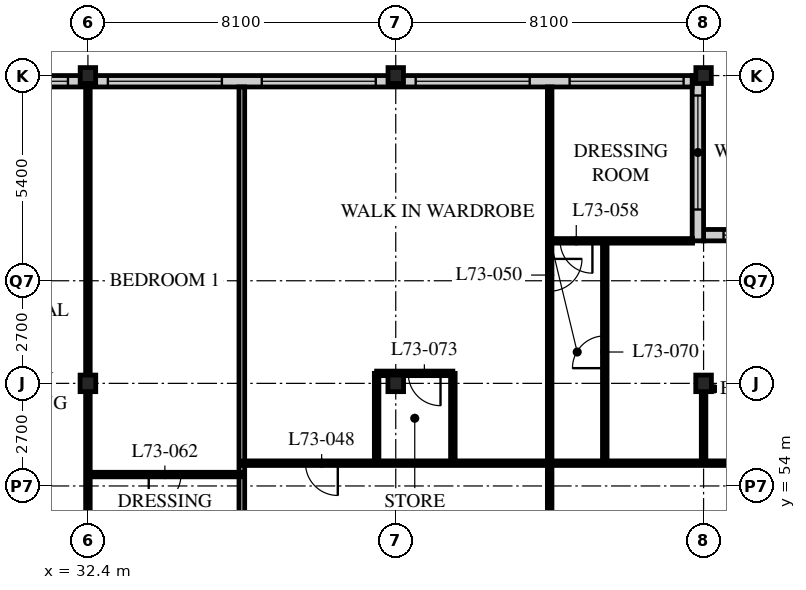
"""IFC4 building model, lengths in metres.
Left out: names, types, materials, properties, quantities, classifications, styles, units other than length and angle.
Written with IfcOpenShell. Run it as: python <this file> out.ifc"""

import sys

from ifc_helpers import new_model, si_unit, direction, frame, frame_2d, origin, origin_2d, place, context, subcontext, project, spatial, rectangle, i_section, extrude, element, fill, save


model = new_model("IFC4")
c1 = context("Model", 3, precision=1e-05, world=origin(), true_north=direction((0.0, 1.0)))
c2 = subcontext(c1, "Body", "Model", "MODEL_VIEW")
j1 = project(units=[si_unit("LENGTHUNIT", "METRE"), si_unit("PLANEANGLEUNIT", "RADIAN")], contexts=[c1])
p1 = place(None, origin())
s1 = spatial("IfcSite", under=j1, at=p1, CompositionType="ELEMENT")
p2 = place(p1, origin())
s2 = spatial("IfcBuilding", under=s1, at=p2, CompositionType="ELEMENT")
p3 = place(p2, frame((0.0, 0.0, 285.3)))
s3 = spatial("IfcBuildingStorey", under=s2, at=p3, CompositionType="ELEMENT", Elevation=285.3)
p4 = place(p3, frame((32.4, 56.7, 0.0), z_axis=(0.0, 0.0, 1.0), x_axis=(1.0, 0.0, 0.0)))
e1 = element("IfcColumn", 1, at=p4, inside=s3, PredefinedType="COLUMN", context=c2, shape_type="SweptSolid", body=[
    extrude(i_section(OverallWidth=0.412, OverallDepth=0.437, WebThickness=0.036, FlangeThickness=0.058, FilletRadius=0.015, at=origin_2d()), origin(), (0.0, 0.0, 1.0), 3.9),
])
p5 = place(p3, frame((32.4, 64.8, 0.0), z_axis=(0.0, 0.0, 1.0), x_axis=(1.0, 0.0, 0.0)))
e2 = element("IfcColumn", 2, at=p5, inside=s3, PredefinedType="COLUMN", context=c2, shape_type="SweptSolid", body=[
    extrude(i_section(OverallWidth=0.407, OverallDepth=0.419, WebThickness=0.031, FlangeThickness=0.049, FilletRadius=0.015, at=origin_2d()), origin(), (0.0, 0.0, 1.0), 3.9),
])
p6 = place(p3, frame((40.5, 56.7, 0.0), z_axis=(0.0, 0.0, 1.0), x_axis=(1.0, 0.0, 0.0)))
e3 = element("IfcColumn", 3, at=p6, inside=s3, PredefinedType="COLUMN", context=c2, shape_type="SweptSolid", body=[
    extrude(i_section(OverallWidth=0.412, OverallDepth=0.437, WebThickness=0.036, FlangeThickness=0.058, FilletRadius=0.015, at=origin_2d()), origin(), (0.0, 0.0, 1.0), 3.9),
])
p7 = place(p3, frame((40.5, 64.8, 0.0), z_axis=(0.0, 0.0, 1.0), x_axis=(1.0, 0.0, 0.0)))
e4 = element("IfcColumn", 4, at=p7, inside=s3, PredefinedType="COLUMN", context=c2, shape_type="SweptSolid", body=[
    extrude(i_section(OverallWidth=0.407, OverallDepth=0.419, WebThickness=0.031, FlangeThickness=0.049, FilletRadius=0.015, at=origin_2d()), origin(), (0.0, 0.0, 1.0), 3.9),
])
p8 = place(p3, frame((48.6, 56.7, 0.0), z_axis=(0.0, 0.0, 1.0), x_axis=(1.0, 0.0, 0.0)))
e5 = element("IfcColumn", 5, at=p8, inside=s3, PredefinedType="COLUMN", context=c2, shape_type="SweptSolid", body=[
    extrude(i_section(OverallWidth=0.412, OverallDepth=0.437, WebThickness=0.036, FlangeThickness=0.058, FilletRadius=0.015, at=origin_2d()), origin(), (0.0, 0.0, 1.0), 3.9),
])
p9 = place(p3, frame((48.6, 64.8, 0.0), z_axis=(0.0, 0.0, 1.0), x_axis=(1.0, 0.0, 0.0)))
e6 = element("IfcColumn", 6, at=p9, inside=s3, PredefinedType="COLUMN", context=c2, shape_type="SweptSolid", body=[
    extrude(i_section(OverallWidth=0.407, OverallDepth=0.419, WebThickness=0.031, FlangeThickness=0.049, FilletRadius=0.015, at=origin_2d()), origin(), (0.0, 0.0, 1.0), 3.9),
])
p10 = place(p3, frame((52.35, 60.6, 0.0), z_axis=(0.0, 0.0, 1.0), x_axis=(-1.0, 0.0, 0.0)))
e7 = element("IfcWall", 7, at=p10, inside=s3, PredefinedType="SOLIDWALL", context=c2, shape_type="SweptSolid", body=[
    extrude(rectangle(XDim=3.75, YDim=0.3, at=frame_2d((1.875, 0.0))), origin(), (0.0, 0.0, 1.0), 3.69),
])
p11 = place(p10, frame((0.225, 0.0, 0.6)))
e8 = element("IfcOpeningElement", 8, at=p11, cuts=e7, PredefinedType="OPENING", context=c2, shape_type="SweptSolid", body=[
    extrude(rectangle(XDim=3.0, YDim=2.3, at=frame_2d((1.5, 1.15))), frame((0.0, 0.16, 0.0), z_axis=(0.0, -1.0, 0.0), x_axis=(1.0, 0.0, 0.0)), (0.0, 0.0, 1.0), 0.32),
])
p12 = place(p3, frame((48.45, 60.45, 0.0), z_axis=(0.0, 0.0, 1.0), x_axis=(0.0, 1.0, 0.0)))
e9 = element("IfcWall", 9, at=p12, inside=s3, PredefinedType="SOLIDWALL", context=c2, shape_type="SweptSolid", body=[
    extrude(rectangle(XDim=4.35, YDim=0.3, at=frame_2d((2.175, 0.0))), origin(), (0.0, 0.0, 1.0), 3.69),
])
p13 = place(p12, frame((0.825, 0.0, 0.6)))
e10 = element("IfcOpeningElement", 10, at=p13, cuts=e9, PredefinedType="OPENING", context=c2, shape_type="SweptSolid", body=[
    extrude(rectangle(XDim=3.0, YDim=2.3, at=frame_2d((1.5, 1.15))), frame((0.0, 0.16, 0.0), z_axis=(0.0, -1.0, 0.0), x_axis=(1.0, 0.0, 0.0)), (0.0, 0.0, 1.0), 0.32),
])
p14 = place(p3, frame((48.3, 64.65, 0.0), z_axis=(0.0, 0.0, 1.0), x_axis=(-1.0, 0.0, 0.0)))
e11 = element("IfcWall", 11, at=p14, inside=s3, PredefinedType="SOLIDWALL", context=c2, shape_type="SweptSolid", body=[
    extrude(rectangle(XDim=40.2, YDim=0.3, at=frame_2d((20.1, 0.0))), origin(), (0.0, 0.0, 1.0), 3.69),
])
p15 = place(p14, frame((0.225, 0.0, 0.6)))
e12 = element("IfcOpeningElement", 12, at=p15, cuts=e11, PredefinedType="OPENING", context=c2, shape_type="SweptSolid", body=[
    extrude(rectangle(XDim=3.0, YDim=2.4, at=frame_2d((1.5, 1.2))), frame((0.0, 0.16, 0.0), z_axis=(0.0, -1.0, 0.0), x_axis=(1.0, 0.0, 0.0)), (0.0, 0.0, 1.0), 0.32),
])
p16 = place(p14, frame((4.275, 0.0, 0.6)))
e13 = element("IfcOpeningElement", 13, at=p16, cuts=e11, PredefinedType="OPENING", context=c2, shape_type="SweptSolid", body=[
    extrude(rectangle(XDim=3.0, YDim=2.4, at=frame_2d((1.5, 1.2))), frame((0.0, 0.16, 0.0), z_axis=(0.0, -1.0, 0.0), x_axis=(1.0, 0.0, 0.0)), (0.0, 0.0, 1.0), 0.32),
])
p17 = place(p14, frame((8.325, 0.0, 0.6)))
e14 = element("IfcOpeningElement", 14, at=p17, cuts=e11, PredefinedType="OPENING", context=c2, shape_type="SweptSolid", body=[
    extrude(rectangle(XDim=3.0, YDim=2.4, at=frame_2d((1.5, 1.2))), frame((0.0, 0.16, 0.0), z_axis=(0.0, -1.0, 0.0), x_axis=(1.0, 0.0, 0.0)), (0.0, 0.0, 1.0), 0.32),
])
p18 = place(p14, frame((12.375, 0.0, 0.6)))
e15 = element("IfcOpeningElement", 15, at=p18, cuts=e11, PredefinedType="OPENING", context=c2, shape_type="SweptSolid", body=[
    extrude(rectangle(XDim=3.0, YDim=2.4, at=frame_2d((1.5, 1.2))), frame((0.0, 0.16, 0.0), z_axis=(0.0, -1.0, 0.0), x_axis=(1.0, 0.0, 0.0)), (0.0, 0.0, 1.0), 0.32),
])
p19 = place(p14, frame((16.425, 0.0, 0.6)))
e16 = element("IfcOpeningElement", 16, at=p19, cuts=e11, PredefinedType="OPENING", context=c2, shape_type="SweptSolid", body=[
    extrude(rectangle(XDim=3.0, YDim=2.4, at=frame_2d((1.5, 1.2))), frame((0.0, 0.16, 0.0), z_axis=(0.0, -1.0, 0.0), x_axis=(1.0, 0.0, 0.0)), (0.0, 0.0, 1.0), 0.32),
])
p20 = place(p14, frame((20.475, 0.0, 0.6)))
e17 = element("IfcOpeningElement", 17, at=p20, cuts=e11, PredefinedType="OPENING", context=c2, shape_type="SweptSolid", body=[
    extrude(rectangle(XDim=3.0, YDim=2.4, at=frame_2d((1.5, 1.2))), frame((0.0, 0.16, 0.0), z_axis=(0.0, -1.0, 0.0), x_axis=(1.0, 0.0, 0.0)), (0.0, 0.0, 1.0), 0.32),
])
p21 = place(p14, frame((24.525, 0.0, 0.6)))
e18 = element("IfcOpeningElement", 18, at=p21, cuts=e11, PredefinedType="OPENING", context=c2, shape_type="SweptSolid", body=[
    extrude(rectangle(XDim=3.0, YDim=2.4, at=frame_2d((1.5, 1.2))), frame((0.0, 0.16, 0.0), z_axis=(0.0, -1.0, 0.0), x_axis=(1.0, 0.0, 0.0)), (0.0, 0.0, 1.0), 0.32),
])
p22 = place(p14, frame((28.575, 0.0, 0.6)))
e19 = element("IfcOpeningElement", 19, at=p22, cuts=e11, PredefinedType="OPENING", context=c2, shape_type="SweptSolid", body=[
    extrude(rectangle(XDim=3.0, YDim=2.4, at=frame_2d((1.5, 1.2))), frame((0.0, 0.16, 0.0), z_axis=(0.0, -1.0, 0.0), x_axis=(1.0, 0.0, 0.0)), (0.0, 0.0, 1.0), 0.32),
])
p23 = place(p14, frame((32.625, 0.0, 0.6)))
e20 = element("IfcOpeningElement", 20, at=p23, cuts=e11, PredefinedType="OPENING", context=c2, shape_type="SweptSolid", body=[
    extrude(rectangle(XDim=3.0, YDim=2.4, at=frame_2d((1.5, 1.2))), frame((0.0, 0.16, 0.0), z_axis=(0.0, -1.0, 0.0), x_axis=(1.0, 0.0, 0.0)), (0.0, 0.0, 1.0), 0.32),
])
p24 = place(p14, frame((36.675, 0.0, 0.6)))
e21 = element("IfcOpeningElement", 21, at=p24, cuts=e11, PredefinedType="OPENING", context=c2, shape_type="SweptSolid", body=[
    extrude(rectangle(XDim=3.0, YDim=2.4, at=frame_2d((1.5, 1.2))), frame((0.0, 0.16, 0.0), z_axis=(0.0, -1.0, 0.0), x_axis=(1.0, 0.0, 0.0)), (0.0, 0.0, 1.0), 0.32),
])
p25 = place(p3, frame((32.4, 51.0, 0.0), z_axis=(0.0, 0.0, 1.0), x_axis=(0.0, 1.0, 0.0)))
e22 = element("IfcWall", 22, at=p25, inside=s3, PredefinedType="PARTITIONING", context=c2, shape_type="SweptSolid", body=[
    extrude(rectangle(XDim=13.5, YDim=0.12, at=frame_2d((6.75, 0.0))), origin(), (0.0, 0.0, 1.0), 3.078),
])
p26 = place(p3, frame((36.45, 64.5, 0.0), z_axis=(0.0, 0.0, 1.0), x_axis=(0.0, -1.0, 0.0)))
e23 = element("IfcWall", 23, at=p26, inside=s3, PredefinedType="PARTITIONING", context=c2, shape_type="SweptSolid", body=[
    extrude(rectangle(XDim=15.9, YDim=0.15, at=frame_2d((7.95, 0.0))), origin(), (0.0, 0.0, 1.0), 3.69),
])
p27 = place(p3, frame((36.45, 54.6, 0.0), z_axis=(0.0, 0.0, 1.0), x_axis=(1.0, 0.0, 0.0)))
e24 = element("IfcWall", 24, at=p27, inside=s3, PredefinedType="PARTITIONING", context=c2, shape_type="SweptSolid", body=[
    extrude(rectangle(XDim=19.95, YDim=0.12, at=frame_2d((9.975, 0.0))), origin(), (0.0, 0.0, 1.0), 3.69),
])
p28 = place(p27, frame((1.675, 0.0, 0.0)))
e25 = element("IfcOpeningElement", 25, at=p28, cuts=e24, PredefinedType="OPENING", context=c2, shape_type="SweptSolid", body=[
    extrude(rectangle(XDim=0.85, YDim=2.1, at=frame_2d((0.425, 1.05))), frame((0.0, 0.07, 0.0), z_axis=(0.0, -1.0, 0.0), x_axis=(1.0, 0.0, 0.0)), (0.0, 0.0, 1.0), 0.14),
])
p29 = place(p3, frame((44.55, 64.5, 0.0), z_axis=(0.0, 0.0, 1.0), x_axis=(0.0, -1.0, 0.0)))
e26 = element("IfcWall", 26, at=p29, inside=s3, PredefinedType="PARTITIONING", context=c2, shape_type="SweptSolid", body=[
    extrude(rectangle(XDim=17.7, YDim=0.12, at=frame_2d((8.85, 0.0))), origin(), (0.0, 0.0, 1.0), 3.69),
])
p30 = place(p29, frame((12.475, 0.0, 0.0)))
e27 = element("IfcOpeningElement", 27, at=p30, cuts=e26, PredefinedType="OPENING", context=c2, shape_type="SweptSolid", body=[
    extrude(rectangle(XDim=0.85, YDim=2.1, at=frame_2d((0.425, 1.05))), frame((0.0, 0.07, 0.0), z_axis=(0.0, -1.0, 0.0), x_axis=(1.0, 0.0, 0.0)), (0.0, 0.0, 1.0), 0.14),
])
p31 = place(p29, frame((4.525, 0.0, 0.0)))
e28 = element("IfcOpeningElement", 28, at=p31, cuts=e26, PredefinedType="OPENING", context=c2, shape_type="SweptSolid", body=[
    extrude(rectangle(XDim=0.85, YDim=2.1, at=frame_2d((0.425, 1.05))), frame((0.0, 0.07, 0.0), z_axis=(0.0, -1.0, 0.0), x_axis=(1.0, 0.0, 0.0)), (0.0, 0.0, 1.0), 0.14),
])
p32 = place(p3, frame((48.31, 60.45, 0.0), z_axis=(0.0, 0.0, 1.0), x_axis=(-1.0, 0.0, 0.0)))
e29 = element("IfcWall", 29, at=p32, inside=s3, PredefinedType="PARTITIONING", context=c2, shape_type="SweptSolid", body=[
    extrude(rectangle(XDim=3.76, YDim=0.12, at=frame_2d((1.88, 0.0))), origin(), (0.0, 0.0, 1.0), 3.69),
])
p33 = place(p32, frame((2.635, 0.0, 0.0)))
e30 = element("IfcOpeningElement", 30, at=p33, cuts=e29, PredefinedType="OPENING", context=c2, shape_type="SweptSolid", body=[
    extrude(rectangle(XDim=0.85, YDim=2.1, at=frame_2d((0.425, 1.05))), frame((0.0, 0.07, 0.0), z_axis=(0.0, -1.0, 0.0), x_axis=(1.0, 0.0, 0.0)), (0.0, 0.0, 1.0), 0.14),
])
p34 = place(p3, frame((32.4, 54.3, 0.0), z_axis=(0.0, 0.0, 1.0), x_axis=(1.0, 0.0, 0.0)))
e31 = element("IfcWall", 31, at=p34, inside=s3, PredefinedType="PARTITIONING", context=c2, shape_type="SweptSolid", body=[
    extrude(rectangle(XDim=4.05, YDim=0.12, at=frame_2d((2.025, 0.0))), origin(), (0.0, 0.0, 1.0), 3.69),
])
p35 = place(p34, frame((1.6, 0.0, 0.0)))
e32 = element("IfcOpeningElement", 32, at=p35, cuts=e31, PredefinedType="OPENING", context=c2, shape_type="SweptSolid", body=[
    extrude(rectangle(XDim=0.85, YDim=2.1, at=frame_2d((0.425, 1.05))), frame((0.0, 0.07, 0.0), z_axis=(0.0, -1.0, 0.0), x_axis=(1.0, 0.0, 0.0)), (0.0, 0.0, 1.0), 0.14),
])
p36 = place(p3, frame((46.0, 54.6, 0.0), z_axis=(0.0, 0.0, 1.0), x_axis=(0.0, 1.0, 0.0)))
e33 = element("IfcWall", 33, at=p36, inside=s3, PredefinedType="PARTITIONING", context=c2, shape_type="SweptSolid", body=[
    extrude(rectangle(XDim=5.85, YDim=0.12, at=frame_2d((2.925, 0.0))), origin(), (0.0, 0.0, 1.0), 3.69),
])
p37 = place(p36, frame((2.5, 0.0, 0.0)))
e34 = element("IfcOpeningElement", 34, at=p37, cuts=e33, PredefinedType="OPENING", context=c2, shape_type="SweptSolid", body=[
    extrude(rectangle(XDim=0.85, YDim=2.1, at=frame_2d((0.425, 1.05))), frame((0.0, 0.07, 0.0), z_axis=(0.0, -1.0, 0.0), x_axis=(1.0, 0.0, 0.0)), (0.0, 0.0, 1.0), 0.14),
])
for number, where, z_axis, x_axis in (
    (35, (39.997, 54.6, 0.0), (0.0, 0.0, 1.0), (0.0, 1.0, 0.0)),
    (36, (42.003, 54.6, 0.0), (0.0, 0.0, 1.0), (0.0, 1.0, 0.0)),
):
    element("IfcWall", number, at=place(p3, frame(where, z_axis=z_axis, x_axis=x_axis)), inside=s3, PredefinedType="PARTITIONING", context=c2, shape_type="SweptSolid", body=[
        extrude(rectangle(XDim=2.363, YDim=0.12, at=frame_2d((1.181, 0.0))), origin(), (0.0, 0.0, 1.0), 3.69),
    ])
p38 = place(p3, frame((39.997, 56.963, 0.0), z_axis=(0.0, 0.0, 1.0), x_axis=(1.0, 0.0, 0.0)))
e37 = element("IfcWall", 37, at=p38, inside=s3, PredefinedType="PARTITIONING", context=c2, shape_type="SweptSolid", body=[
    extrude(rectangle(XDim=2.006, YDim=0.12, at=frame_2d((1.003, 0.0))), origin(), (0.0, 0.0, 1.0), 3.69),
])
p39 = place(p38, frame((0.831, 0.0, 0.0)))
e38 = element("IfcOpeningElement", 38, at=p39, cuts=e37, PredefinedType="OPENING", context=c2, shape_type="SweptSolid", body=[
    extrude(rectangle(XDim=0.85, YDim=2.1, at=frame_2d((0.425, 1.05))), frame((0.0, 0.07, 0.0), z_axis=(0.0, -1.0, 0.0), x_axis=(1.0, 0.0, 0.0)), (0.0, 0.0, 1.0), 0.14),
])
p40 = place(p3, frame((48.6, 54.6, 0.0), z_axis=(0.0, 0.0, 1.0), x_axis=(0.0, 1.0, 0.0)))
e39 = element("IfcWall", 39, at=p40, inside=s3, PredefinedType="PARTITIONING", context=c2, shape_type="SweptSolid", body=[
    extrude(rectangle(XDim=1.897, YDim=0.12, at=frame_2d((0.948, 0.0))), origin(), (0.0, 0.0, 1.0), 3.078),
])
p41 = place(p11, origin())
e40 = element("IfcWindow", 40, at=p41, inside=s3, PartitioningType="SINGLE_PANEL", PredefinedType="WINDOW", context=c2, shape_type="SweptSolid", body=[
    extrude(rectangle(XDim=3.0, YDim=2.3, at=frame_2d((1.5, 1.15))), frame((0.0, 0.03, 0.0), z_axis=(0.0, -1.0, 0.0), x_axis=(1.0, 0.0, 0.0)), (0.0, 0.0, 1.0), 0.06),
])
fill(e8, e40)
p42 = place(p13, origin())
e41 = element("IfcWindow", 41, at=p42, inside=s3, PartitioningType="SINGLE_PANEL", PredefinedType="WINDOW", context=c2, shape_type="SweptSolid", body=[
    extrude(rectangle(XDim=3.0, YDim=2.3, at=frame_2d((1.5, 1.15))), frame((0.0, 0.03, 0.0), z_axis=(0.0, -1.0, 0.0), x_axis=(1.0, 0.0, 0.0)), (0.0, 0.0, 1.0), 0.06),
])
fill(e10, e41)
p43 = place(p15, origin())
e42 = element("IfcWindow", 42, at=p43, inside=s3, PartitioningType="SINGLE_PANEL", PredefinedType="WINDOW", context=c2, shape_type="SweptSolid", body=[
    extrude(rectangle(XDim=3.0, YDim=2.4, at=frame_2d((1.5, 1.2))), frame((0.0, 0.03, 0.0), z_axis=(0.0, -1.0, 0.0), x_axis=(1.0, 0.0, 0.0)), (0.0, 0.0, 1.0), 0.06),
])
fill(e12, e42)
p44 = place(p16, origin())
e43 = element("IfcWindow", 43, at=p44, inside=s3, PartitioningType="SINGLE_PANEL", PredefinedType="WINDOW", context=c2, shape_type="SweptSolid", body=[
    extrude(rectangle(XDim=3.0, YDim=2.4, at=frame_2d((1.5, 1.2))), frame((0.0, 0.03, 0.0), z_axis=(0.0, -1.0, 0.0), x_axis=(1.0, 0.0, 0.0)), (0.0, 0.0, 1.0), 0.06),
])
fill(e13, e43)
p45 = place(p17, origin())
e44 = element("IfcWindow", 44, at=p45, inside=s3, PartitioningType="SINGLE_PANEL", PredefinedType="WINDOW", context=c2, shape_type="SweptSolid", body=[
    extrude(rectangle(XDim=3.0, YDim=2.4, at=frame_2d((1.5, 1.2))), frame((0.0, 0.03, 0.0), z_axis=(0.0, -1.0, 0.0), x_axis=(1.0, 0.0, 0.0)), (0.0, 0.0, 1.0), 0.06),
])
fill(e14, e44)
p46 = place(p18, origin())
e45 = element("IfcWindow", 45, at=p46, inside=s3, PartitioningType="SINGLE_PANEL", PredefinedType="WINDOW", context=c2, shape_type="SweptSolid", body=[
    extrude(rectangle(XDim=3.0, YDim=2.4, at=frame_2d((1.5, 1.2))), frame((0.0, 0.03, 0.0), z_axis=(0.0, -1.0, 0.0), x_axis=(1.0, 0.0, 0.0)), (0.0, 0.0, 1.0), 0.06),
])
fill(e15, e45)
p47 = place(p19, origin())
e46 = element("IfcWindow", 46, at=p47, inside=s3, PartitioningType="SINGLE_PANEL", PredefinedType="WINDOW", context=c2, shape_type="SweptSolid", body=[
    extrude(rectangle(XDim=3.0, YDim=2.4, at=frame_2d((1.5, 1.2))), frame((0.0, 0.03, 0.0), z_axis=(0.0, -1.0, 0.0), x_axis=(1.0, 0.0, 0.0)), (0.0, 0.0, 1.0), 0.06),
])
fill(e16, e46)
p48 = place(p28, origin())
e47 = element("IfcDoor", 47, at=p48, inside=s3, OperationType="SINGLE_SWING_LEFT", PredefinedType="DOOR", context=c2, shape_type="SweptSolid", body=[
    extrude(rectangle(XDim=0.85, YDim=2.1, at=frame_2d((0.425, 1.05))), frame((0.0, 0.025, 0.0), z_axis=(0.0, -1.0, 0.0), x_axis=(1.0, 0.0, 0.0)), (0.0, 0.0, 1.0), 0.05),
])
fill(e25, e47)
p49 = place(p31, origin())
e48 = element("IfcDoor", 48, at=p49, inside=s3, OperationType="SINGLE_SWING_LEFT", PredefinedType="DOOR", context=c2, shape_type="SweptSolid", body=[
    extrude(rectangle(XDim=0.85, YDim=2.1, at=frame_2d((0.425, 1.05))), frame((0.0, 0.025, 0.0), z_axis=(0.0, -1.0, 0.0), x_axis=(1.0, 0.0, 0.0)), (0.0, 0.0, 1.0), 0.05),
])
fill(e28, e48)
p50 = place(p33, origin())
e49 = element("IfcDoor", 49, at=p50, inside=s3, OperationType="SINGLE_SWING_LEFT", PredefinedType="DOOR", context=c2, shape_type="SweptSolid", body=[
    extrude(rectangle(XDim=0.85, YDim=2.1, at=frame_2d((0.425, 1.05))), frame((0.0, 0.025, 0.0), z_axis=(0.0, -1.0, 0.0), x_axis=(1.0, 0.0, 0.0)), (0.0, 0.0, 1.0), 0.05),
])
fill(e30, e49)
p51 = place(p35, origin())
e50 = element("IfcDoor", 50, at=p51, inside=s3, OperationType="SINGLE_SWING_RIGHT", PredefinedType="DOOR", context=c2, shape_type="SweptSolid", body=[
    extrude(rectangle(XDim=0.85, YDim=2.1, at=frame_2d((0.425, 1.05))), frame((0.0, 0.025, 0.0), z_axis=(0.0, -1.0, 0.0), x_axis=(1.0, 0.0, 0.0)), (0.0, 0.0, 1.0), 0.05),
])
fill(e32, e50)
p52 = place(p37, origin())
e51 = element("IfcDoor", 51, at=p52, inside=s3, OperationType="SINGLE_SWING_LEFT", PredefinedType="DOOR", context=c2, shape_type="SweptSolid", body=[
    extrude(rectangle(XDim=0.85, YDim=2.1, at=frame_2d((0.425, 1.05))), frame((0.0, 0.025, 0.0), z_axis=(0.0, -1.0, 0.0), x_axis=(1.0, 0.0, 0.0)), (0.0, 0.0, 1.0), 0.05),
])
fill(e34, e51)
p53 = place(p39, origin())
e52 = element("IfcDoor", 52, at=p53, inside=s3, OperationType="SINGLE_SWING_LEFT", PredefinedType="DOOR", context=c2, shape_type="SweptSolid", body=[
    extrude(rectangle(XDim=0.85, YDim=2.1, at=frame_2d((0.425, 1.05))), frame((0.0, 0.025, 0.0), z_axis=(0.0, -1.0, 0.0), x_axis=(1.0, 0.0, 0.0)), (0.0, 0.0, 1.0), 0.05),
])
fill(e38, e52)
save(model, sys.argv[1])
